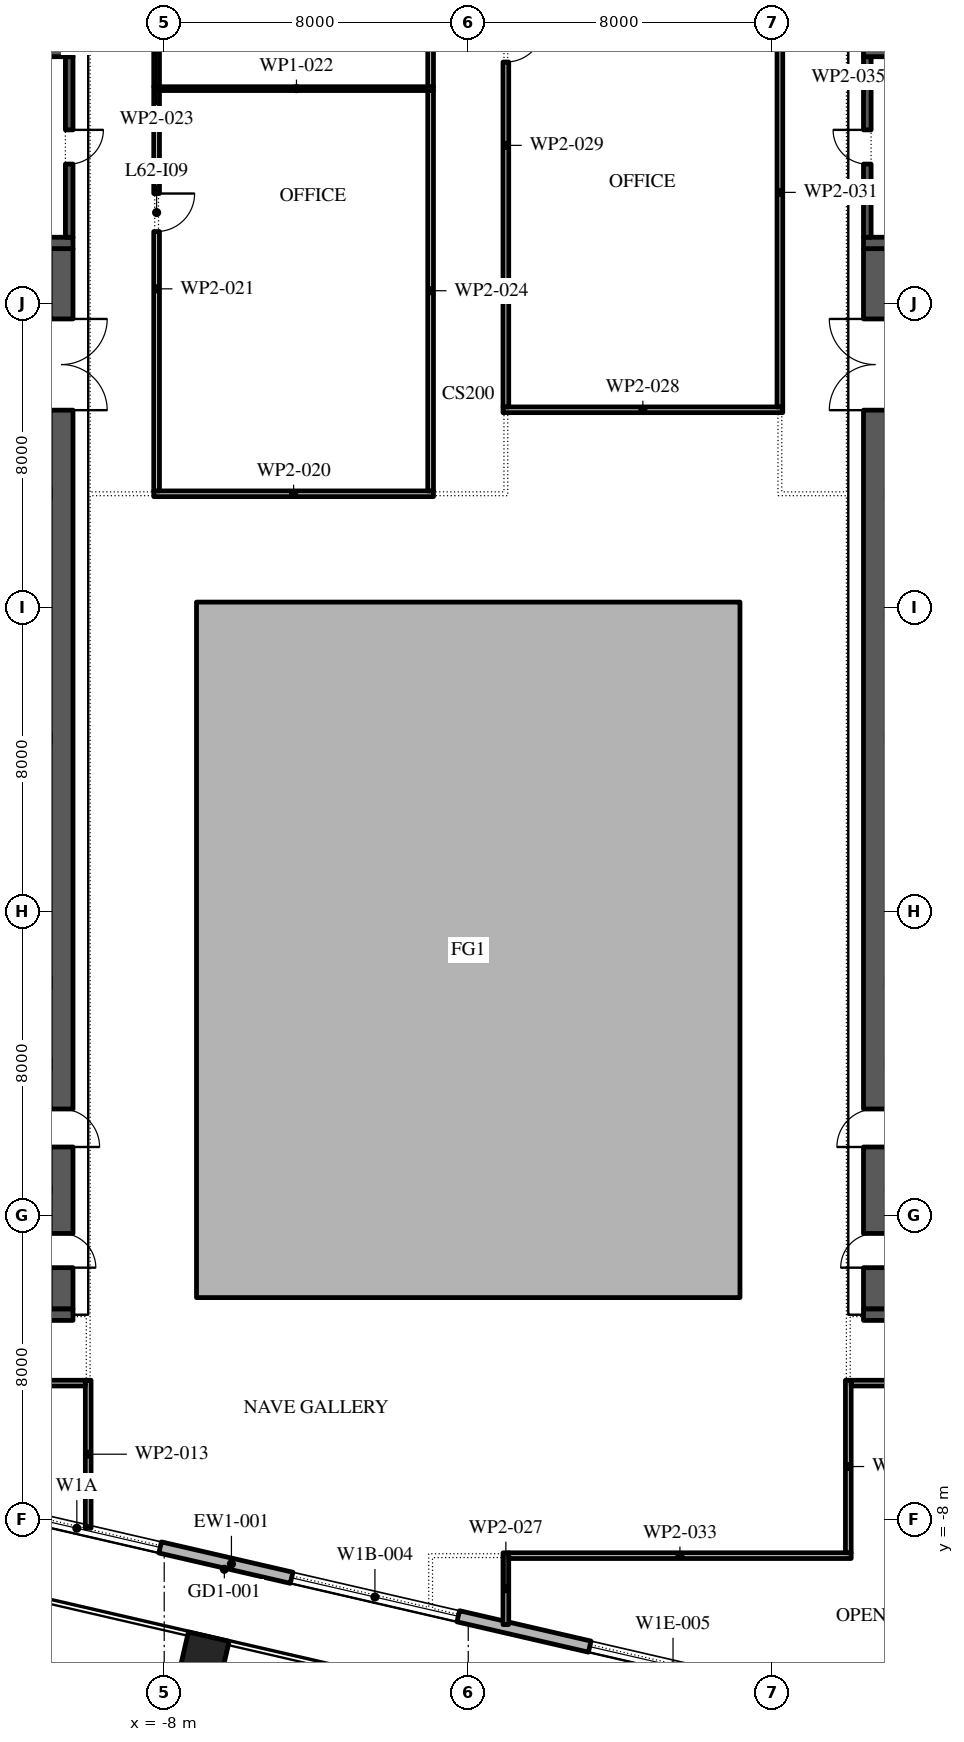
"""IFC4 building model, lengths in metres.
Left out: names, types, materials, properties, quantities, classifications, styles, units other than length and angle.
Written with IfcOpenShell. Run it as: python <this file> out.ifc"""

import sys

from ifc_helpers import new_model, si_unit, direction, frame, frame_2d, origin, origin_2d, place, context, subcontext, project, spatial, polyline, rectangle, outline, extrude, element, fill, save


model = new_model("IFC4")
c1 = context("Model", 3, precision=1e-05, world=origin(), true_north=direction((0.0, 1.0)))
c2 = subcontext(c1, "Body", "Model", "MODEL_VIEW")
j1 = project(units=[si_unit("LENGTHUNIT", "METRE"), si_unit("PLANEANGLEUNIT", "RADIAN")], contexts=[c1])
p1 = place(None, origin())
s1 = spatial("IfcSite", under=j1, at=p1, CompositionType="ELEMENT")
p2 = place(p1, origin())
s2 = spatial("IfcBuilding", under=s1, at=p2, CompositionType="ELEMENT")
p3 = place(p2, frame((0.0, 0.0, 285.0)))
s3 = spatial("IfcBuildingStorey", under=s2, at=p3, CompositionType="ELEMENT", Elevation=285.0)
p4 = place(p3, frame((-6.951, -11.608, 0.0), z_axis=(0.0, 0.0, 1.0), x_axis=(0.974370064785, -0.224951054344, 0.0)))
e1 = element("IfcColumn", 1, at=p4, inside=s3, PredefinedType="COLUMN", context=c2, shape_type="SweptSolid", body=[
    extrude(rectangle(XDim=1.1, YDim=1.1, at=origin_2d()), origin(), (0.0, 0.0, 1.0), 4.2),
])
p5 = place(p3, origin())
e2 = element("IfcWall", 2, at=p5, inside=s3, PredefinedType="STANDARD", context=c2, shape_type="SweptSolid", body=[
    extrude(outline(polyline([(-7.15, -2.15), (7.15, -2.15), (7.15, 16.15), (-7.15, 16.15), (-7.15, -2.15)]), holes=[polyline([(-7.0, -2.0), (-7.0, 16.0), (7.0, 16.0), (7.0, -2.0), (-7.0, -2.0)])]), origin(), (0.0, 0.0, 1.0), 4.0),
])
p6 = place(p3, frame((-29.616, -3.758, 0.0), z_axis=(0.0, 0.0, 1.0), x_axis=(0.974370532314, -0.224949029246, 0.0)))
e3 = element("IfcWall", 3, at=p6, inside=s3, PredefinedType="STANDARD", context=c2, shape_type="SweptSolid", body=[
    extrude(rectangle(XDim=48.0, YDim=0.3, at=frame_2d((24.0, 0.0))), origin(), (0.0, 0.0, 1.0), 4.0),
])
p7 = place(p6, frame((1.625, 0.0, 0.45)))
e4 = element("IfcOpeningElement", 4, at=p7, cuts=e3, PredefinedType="OPENING", context=c2, shape_type="SweptSolid", body=[
    extrude(rectangle(XDim=4.5, YDim=3.05, at=frame_2d((2.25, 1.525))), frame((0.0, 0.16, 0.0), z_axis=(0.0, -1.0, 0.0), x_axis=(1.0, 0.0, 0.0)), (0.0, 0.0, 1.0), 0.32),
])
p8 = place(p6, frame((10.575, 0.0, 0.0)))
e5 = element("IfcOpeningElement", 5, at=p8, cuts=e3, PredefinedType="OPENING", context=c2, shape_type="SweptSolid", body=[
    extrude(rectangle(XDim=2.4, YDim=3.5, at=frame_2d((1.2, 1.75))), frame((0.0, 0.16, 0.0), z_axis=(0.0, -1.0, 0.0), x_axis=(1.0, 0.0, 0.0)), (0.0, 0.0, 1.0), 0.32),
])
p9 = place(p6, frame((17.575, 0.0, 0.45)))
e6 = element("IfcOpeningElement", 6, at=p9, cuts=e3, PredefinedType="OPENING", context=c2, shape_type="SweptSolid", body=[
    extrude(rectangle(XDim=4.5, YDim=3.0, at=frame_2d((2.25, 1.5))), frame((0.0, 0.16, 0.0), z_axis=(0.0, -1.0, 0.0), x_axis=(1.0, 0.0, 0.0)), (0.0, 0.0, 1.0), 0.32),
])
p10 = place(p6, frame((25.625, 0.0, 0.45)))
e7 = element("IfcOpeningElement", 7, at=p10, cuts=e3, PredefinedType="OPENING", context=c2, shape_type="SweptSolid", body=[
    extrude(rectangle(XDim=4.5, YDim=2.95, at=frame_2d((2.25, 1.475))), frame((0.0, 0.16, 0.0), z_axis=(0.0, -1.0, 0.0), x_axis=(1.0, 0.0, 0.0)), (0.0, 0.0, 1.0), 0.32),
])
p11 = place(p6, frame((33.675, 0.0, 0.45)))
e8 = element("IfcOpeningElement", 8, at=p11, cuts=e3, PredefinedType="OPENING", context=c2, shape_type="SweptSolid", body=[
    extrude(rectangle(XDim=4.5, YDim=2.825, at=frame_2d((2.25, 1.413))), frame((0.0, 0.16, 0.0), z_axis=(0.0, -1.0, 0.0), x_axis=(1.0, 0.0, 0.0)), (0.0, 0.0, 1.0), 0.32),
])
p12 = place(p6, frame((42.775, 0.0, 0.0)))
e9 = element("IfcOpeningElement", 9, at=p12, cuts=e3, PredefinedType="OPENING", context=c2, shape_type="SweptSolid", body=[
    extrude(rectangle(XDim=2.4, YDim=3.5, at=frame_2d((1.2, 1.75))), frame((0.0, 0.16, 0.0), z_axis=(0.0, -1.0, 0.0), x_axis=(1.0, 0.0, 0.0)), (0.0, 0.0, 1.0), 0.32),
])
p13 = place(p3, frame((-10.7, -2.45, 0.0), z_axis=(0.0, 0.0, 1.0), x_axis=(0.0, 1.0, 0.0)))
e10 = element("IfcWall", 10, at=p13, inside=s3, PredefinedType="SHEAR", context=c2, shape_type="SweptSolid", body=[
    extrude(rectangle(XDim=27.9, YDim=0.6, at=frame_2d((13.95, 0.0))), origin(), (0.0, 0.0, 1.0), 4.0),
])
p14 = place(p13, frame((23.65, 0.0, 0.0)))
e11 = element("IfcOpeningElement", 11, at=p14, cuts=e10, PredefinedType="OPENING", context=c2, shape_type="SweptSolid", body=[
    extrude(rectangle(XDim=2.4, YDim=2.1, at=frame_2d((1.2, 1.05))), frame((0.0, 0.31, 0.0), z_axis=(0.0, -1.0, 0.0), x_axis=(1.0, 0.0, 0.0)), (0.0, 0.0, 1.0), 0.62),
])
p15 = place(p13, frame((1.087, 0.0, 0.0)))
e12 = element("IfcOpeningElement", 12, at=p15, cuts=e10, PredefinedType="OPENING", context=c2, shape_type="SweptSolid", body=[
    extrude(rectangle(XDim=0.9, YDim=2.1, at=frame_2d((0.45, 1.05))), frame((0.0, 0.31, 0.0), z_axis=(0.0, -1.0, 0.0), x_axis=(1.0, 0.0, 0.0)), (0.0, 0.0, 1.0), 0.62),
])
p16 = place(p13, frame((4.262, 0.0, 0.0)))
e13 = element("IfcOpeningElement", 13, at=p16, cuts=e10, PredefinedType="OPENING", context=c2, shape_type="SweptSolid", body=[
    extrude(rectangle(XDim=1.0, YDim=2.1, at=frame_2d((0.5, 1.05))), frame((0.0, 0.31, 0.0), z_axis=(0.0, -1.0, 0.0), x_axis=(1.0, 0.0, 0.0)), (0.0, 0.0, 1.0), 0.62),
])
for number, where, z_axis, x_axis in (
    (14, (-21.6, -2.6, 0.0), (0.0, 0.0, 1.0), (1.0, 0.0, 0.0)),
    (15, (-21.6, 25.6, 0.0), (0.0, 0.0, 1.0), (1.0, 0.0, 0.0)),
):
    element("IfcWall", number, at=place(p3, frame(where, z_axis=z_axis, x_axis=x_axis)), inside=s3, PredefinedType="SHEAR", context=c2, shape_type="SweptSolid", body=[
        extrude(rectangle(XDim=11.2, YDim=0.3, at=frame_2d((5.6, 0.0))), origin(), (0.0, 0.0, 1.0), 4.0),
    ])
p17 = place(p3, frame((-10.5, 25.75, 0.0), z_axis=(0.0, 0.0, 1.0), x_axis=(0.0, 1.0, 0.0)))
e16 = element("IfcWall", 16, at=p17, inside=s3, PredefinedType="SHEAR", context=c2, shape_type="SweptSolid", body=[
    extrude(rectangle(XDim=4.75, YDim=0.2, at=frame_2d((2.375, 0.0))), origin(), (0.0, 0.0, 1.0), 4.0),
])
p18 = place(p17, frame((1.925, 0.0, 0.0)))
e17 = element("IfcOpeningElement", 17, at=p18, cuts=e16, PredefinedType="OPENING", context=c2, shape_type="SweptSolid", body=[
    extrude(rectangle(XDim=0.9, YDim=2.1, at=frame_2d((0.45, 1.05))), frame((0.0, 0.11, 0.0), z_axis=(0.0, -1.0, 0.0), x_axis=(1.0, 0.0, 0.0)), (0.0, 0.0, 1.0), 0.22),
])
p19 = place(p3, frame((-21.6, 30.6, 0.0), z_axis=(0.0, 0.0, 1.0), x_axis=(1.0, 0.0, 0.0)))
e18 = element("IfcWall", 18, at=p19, inside=s3, PredefinedType="SHEAR", context=c2, shape_type="SweptSolid", body=[
    extrude(rectangle(XDim=11.2, YDim=0.2, at=frame_2d((5.6, 0.0))), origin(), (0.0, 0.0, 1.0), 4.0),
])
p20 = place(p3, frame((10.7, -2.45, 0.0), z_axis=(0.0, 0.0, 1.0), x_axis=(0.0, 1.0, 0.0)))
e19 = element("IfcWall", 19, at=p20, inside=s3, PredefinedType="SHEAR", context=c2, shape_type="SweptSolid", body=[
    extrude(rectangle(XDim=27.9, YDim=0.6, at=frame_2d((13.95, 0.0))), origin(), (0.0, 0.0, 1.0), 4.0),
])
p21 = place(p20, frame((23.65, 0.0, 0.0)))
e20 = element("IfcOpeningElement", 20, at=p21, cuts=e19, PredefinedType="OPENING", context=c2, shape_type="SweptSolid", body=[
    extrude(rectangle(XDim=2.4, YDim=2.1, at=frame_2d((1.2, 1.05))), frame((0.0, 0.31, 0.0), z_axis=(0.0, -1.0, 0.0), x_axis=(1.0, 0.0, 0.0)), (0.0, 0.0, 1.0), 0.62),
])
p22 = place(p20, frame((1.087, 0.0, 0.0)))
e21 = element("IfcOpeningElement", 21, at=p22, cuts=e19, PredefinedType="OPENING", context=c2, shape_type="SweptSolid", body=[
    extrude(rectangle(XDim=0.9, YDim=2.1, at=frame_2d((0.45, 1.05))), frame((0.0, 0.31, 0.0), z_axis=(0.0, -1.0, 0.0), x_axis=(1.0, 0.0, 0.0)), (0.0, 0.0, 1.0), 0.62),
])
p23 = place(p20, frame((4.262, 0.0, 0.0)))
e22 = element("IfcOpeningElement", 22, at=p23, cuts=e19, PredefinedType="OPENING", context=c2, shape_type="SweptSolid", body=[
    extrude(rectangle(XDim=1.0, YDim=2.1, at=frame_2d((0.5, 1.05))), frame((0.0, 0.31, 0.0), z_axis=(0.0, -1.0, 0.0), x_axis=(1.0, 0.0, 0.0)), (0.0, 0.0, 1.0), 0.62),
])
for number, where, z_axis, x_axis in (
    (23, (10.4, -2.6, 0.0), (0.0, 0.0, 1.0), (1.0, 0.0, 0.0)),
    (24, (10.4, 25.6, 0.0), (0.0, 0.0, 1.0), (1.0, 0.0, 0.0)),
):
    element("IfcWall", number, at=place(p3, frame(where, z_axis=z_axis, x_axis=x_axis)), inside=s3, PredefinedType="SHEAR", context=c2, shape_type="SweptSolid", body=[
        extrude(rectangle(XDim=11.2, YDim=0.3, at=frame_2d((5.6, 0.0))), origin(), (0.0, 0.0, 1.0), 4.0),
    ])
p24 = place(p3, frame((10.5, 25.75, 0.0), z_axis=(0.0, 0.0, 1.0), x_axis=(0.0, 1.0, 0.0)))
e25 = element("IfcWall", 25, at=p24, inside=s3, PredefinedType="SHEAR", context=c2, shape_type="SweptSolid", body=[
    extrude(rectangle(XDim=4.75, YDim=0.2, at=frame_2d((2.375, 0.0))), origin(), (0.0, 0.0, 1.0), 4.0),
])
p25 = place(p24, frame((1.925, 0.0, 0.0)))
e26 = element("IfcOpeningElement", 26, at=p25, cuts=e25, PredefinedType="OPENING", context=c2, shape_type="SweptSolid", body=[
    extrude(rectangle(XDim=0.9, YDim=2.1, at=frame_2d((0.45, 1.05))), frame((0.0, 0.11, 0.0), z_axis=(0.0, -1.0, 0.0), x_axis=(1.0, 0.0, 0.0)), (0.0, 0.0, 1.0), 0.22),
])
p26 = place(p3, frame((10.4, 30.6, 0.0), z_axis=(0.0, 0.0, 1.0), x_axis=(1.0, 0.0, 0.0)))
e27 = element("IfcWall", 27, at=p26, inside=s3, PredefinedType="SHEAR", context=c2, shape_type="SweptSolid", body=[
    extrude(rectangle(XDim=11.2, YDim=0.2, at=frame_2d((5.6, 0.0))), origin(), (0.0, 0.0, 1.0), 4.0),
])
p27 = place(p3, frame((-10.0, -8.216, 0.0), z_axis=(0.0, 0.0, 1.0), x_axis=(0.0, 1.0, 0.0)))
e28 = element("IfcWall", 28, at=p27, inside=s3, PredefinedType="PARTITIONING", context=c2, shape_type="SweptSolid", body=[
    extrude(rectangle(XDim=3.891, YDim=0.15, at=frame_2d((1.946, 0.0))), origin(), (0.0, 0.0, 1.0), 4.0),
])
p28 = place(p3, frame((-10.075, -4.4, 0.0), z_axis=(0.0, 0.0, 1.0), x_axis=(-1.0, 0.0, 0.0)))
e29 = element("IfcWall", 29, at=p28, inside=s3, PredefinedType="PARTITIONING", context=c2, shape_type="SweptSolid", body=[
    extrude(rectangle(XDim=11.88, YDim=0.15, at=frame_2d((5.94, 0.0))), origin(), (0.0, 0.0, 1.0), 4.0),
])
p29 = place(p28, frame((5.555, 0.0, 0.0)))
e30 = element("IfcOpeningElement", 30, at=p29, cuts=e29, PredefinedType="OPENING", context=c2, shape_type="SweptSolid", body=[
    extrude(rectangle(XDim=1.0, YDim=2.1, at=frame_2d((0.5, 1.05))), frame((0.0, 0.085, 0.0), z_axis=(0.0, -1.0, 0.0), x_axis=(1.0, 0.0, 0.0)), (0.0, 0.0, 1.0), 0.17),
])
p30 = place(p3, frame((-8.275, 19.0, 0.0), z_axis=(0.0, 0.0, 1.0), x_axis=(1.0, 0.0, 0.0)))
e31 = element("IfcWall", 31, at=p30, inside=s3, PredefinedType="PARTITIONING", context=c2, shape_type="SweptSolid", body=[
    extrude(rectangle(XDim=7.36, YDim=0.15, at=frame_2d((3.68, 0.0))), origin(), (0.0, 0.0, 1.0), 4.0),
])
p31 = place(p3, frame((-8.2, 29.71, 0.0), z_axis=(0.0, 0.0, 1.0), x_axis=(0.0, -1.0, 0.0)))
e32 = element("IfcWall", 32, at=p31, inside=s3, PredefinedType="PARTITIONING", context=c2, shape_type="SweptSolid", body=[
    extrude(rectangle(XDim=10.635, YDim=0.15, at=frame_2d((5.317, 0.0))), origin(), (0.0, 0.0, 1.0), 4.0),
])
p32 = place(p31, frame((2.81, 0.0, 0.0)))
e33 = element("IfcOpeningElement", 33, at=p32, cuts=e32, PredefinedType="OPENING", context=c2, shape_type="SweptSolid", body=[
    extrude(rectangle(XDim=1.0, YDim=2.1, at=frame_2d((0.5, 1.05))), frame((0.0, 0.085, 0.0), z_axis=(0.0, -1.0, 0.0), x_axis=(1.0, 0.0, 0.0)), (0.0, 0.0, 1.0), 0.17),
])
p33 = place(p3, frame((-8.125, 29.66, 0.0), z_axis=(0.0, 0.0, 1.0), x_axis=(1.0, 0.0, 0.0)))
e34 = element("IfcWall", 34, at=p33, inside=s3, PredefinedType="PARTITIONING", context=c2, shape_type="SweptSolid", body=[
    extrude(rectangle(XDim=7.21, YDim=0.1, at=frame_2d((3.605, 0.0))), origin(), (0.0, 0.0, 1.0), 4.0),
])
p34 = place(p3, frame((-8.2, 32.425, 0.0), z_axis=(0.0, 0.0, 1.0), x_axis=(0.0, -1.0, 0.0)))
e35 = element("IfcWall", 35, at=p34, inside=s3, PredefinedType="PARTITIONING", context=c2, shape_type="SweptSolid", body=[
    extrude(rectangle(XDim=2.715, YDim=0.15, at=frame_2d((1.357, 0.0))), origin(), (0.0, 0.0, 1.0), 4.0),
])
p35 = place(p3, frame((-0.99, 19.075, 0.0), z_axis=(0.0, 0.0, 1.0), x_axis=(0.0, 1.0, 0.0)))
e36 = element("IfcWall", 36, at=p35, inside=s3, PredefinedType="PARTITIONING", context=c2, shape_type="SweptSolid", body=[
    extrude(rectangle(XDim=10.535, YDim=0.15, at=frame_2d((5.268, 0.0))), origin(), (0.0, 0.0, 1.0), 4.0),
])
p36 = place(p3, frame((-0.99, 29.71, 0.0), z_axis=(0.0, 0.0, 1.0), x_axis=(0.0, 1.0, 0.0)))
e37 = element("IfcWall", 37, at=p36, inside=s3, PredefinedType="PARTITIONING", context=c2, shape_type="SweptSolid", body=[
    extrude(rectangle(XDim=12.24, YDim=0.15, at=frame_2d((6.12, 0.0))), origin(), (0.0, 0.0, 1.0), 4.0),
])
p37 = place(p36, frame((4.39, 0.0, 0.0)))
e38 = element("IfcOpeningElement", 38, at=p37, cuts=e37, PredefinedType="OPENING", context=c2, shape_type="SweptSolid", body=[
    extrude(rectangle(XDim=1.0, YDim=2.1, at=frame_2d((0.5, 1.05))), frame((0.0, 0.085, 0.0), z_axis=(0.0, -1.0, 0.0), x_axis=(1.0, 0.0, 0.0)), (0.0, 0.0, 1.0), 0.17),
])
p38 = place(p3, frame((0.99, -8.865, 0.0), z_axis=(0.0, 0.0, 1.0), x_axis=(0.0, -1.0, 0.0)))
e39 = element("IfcWall", 39, at=p38, inside=s3, PredefinedType="PARTITIONING", context=c2, shape_type="SweptSolid", body=[
    extrude(rectangle(XDim=1.888, YDim=0.15, at=frame_2d((0.944, 0.0))), origin(), (0.0, 0.0, 1.0), 4.0),
])
p39 = place(p3, frame((0.915, 21.21, 0.0), z_axis=(0.0, 0.0, 1.0), x_axis=(1.0, 0.0, 0.0)))
e40 = element("IfcWall", 40, at=p39, inside=s3, PredefinedType="PARTITIONING", context=c2, shape_type="SweptSolid", body=[
    extrude(rectangle(XDim=7.36, YDim=0.15, at=frame_2d((3.68, 0.0))), origin(), (0.0, 0.0, 1.0), 4.0),
])
p40 = place(p3, frame((0.99, 35.05, 0.0), z_axis=(0.0, 0.0, 1.0), x_axis=(0.0, -1.0, 0.0)))
e41 = element("IfcWall", 41, at=p40, inside=s3, PredefinedType="PARTITIONING", context=c2, shape_type="SweptSolid", body=[
    extrude(rectangle(XDim=13.765, YDim=0.15, at=frame_2d((6.883, 0.0))), origin(), (0.0, 0.0, 1.0), 4.0),
])
p41 = place(p40, frame((3.69, 0.0, 0.0)))
e42 = element("IfcOpeningElement", 42, at=p41, cuts=e41, PredefinedType="OPENING", context=c2, shape_type="SweptSolid", body=[
    extrude(rectangle(XDim=1.0, YDim=2.1, at=frame_2d((0.5, 1.05))), frame((0.0, 0.085, 0.0), z_axis=(0.0, -1.0, 0.0), x_axis=(1.0, 0.0, 0.0)), (0.0, 0.0, 1.0), 0.17),
])
p42 = place(p3, frame((8.2, 21.285, 0.0), z_axis=(0.0, 0.0, 1.0), x_axis=(0.0, 1.0, 0.0)))
e43 = element("IfcWall", 43, at=p42, inside=s3, PredefinedType="PARTITIONING", context=c2, shape_type="SweptSolid", body=[
    extrude(rectangle(XDim=11.29, YDim=0.15, at=frame_2d((5.645, 0.0))), origin(), (0.0, 0.0, 1.0), 4.0),
])
p43 = place(p3, frame((10.075, -8.94, 0.0), z_axis=(0.0, 0.0, 1.0), x_axis=(-1.0, 0.0, 0.0)))
e44 = element("IfcWall", 44, at=p43, inside=s3, PredefinedType="PARTITIONING", context=c2, shape_type="SweptSolid", body=[
    extrude(rectangle(XDim=9.01, YDim=0.15, at=frame_2d((4.505, 0.0))), origin(), (0.0, 0.0, 1.0), 4.0),
])
p44 = place(p3, frame((10.0, -4.325, 0.0), z_axis=(0.0, 0.0, 1.0), x_axis=(0.0, -1.0, 0.0)))
e45 = element("IfcWall", 45, at=p44, inside=s3, PredefinedType="PARTITIONING", context=c2, shape_type="SweptSolid", body=[
    extrude(rectangle(XDim=4.54, YDim=0.15, at=frame_2d((2.27, 0.0))), origin(), (0.0, 0.0, 1.0), 4.0),
])
p45 = place(p3, frame((22.968, -4.4, 0.0), z_axis=(0.0, 0.0, 1.0), x_axis=(-1.0, 0.0, 0.0)))
e46 = element("IfcWall", 46, at=p45, inside=s3, PredefinedType="PARTITIONING", context=c2, shape_type="SweptSolid", body=[
    extrude(rectangle(XDim=12.893, YDim=0.15, at=frame_2d((6.447, 0.0))), origin(), (0.0, 0.0, 1.0), 4.0),
])
p46 = place(p45, frame((3.318, 0.0, 0.0)))
e47 = element("IfcOpeningElement", 47, at=p46, cuts=e46, PredefinedType="OPENING", context=c2, shape_type="SweptSolid", body=[
    extrude(rectangle(XDim=1.0, YDim=2.1, at=frame_2d((0.5, 1.05))), frame((0.0, 0.085, 0.0), z_axis=(0.0, -1.0, 0.0), x_axis=(1.0, 0.0, 0.0)), (0.0, 0.0, 1.0), 0.17),
])
p47 = place(p9, origin())
e48 = element("IfcWindow", 48, at=p47, inside=s3, PartitioningType="DOUBLE_PANEL_VERTICAL", PredefinedType="WINDOW", context=c2, shape_type="SweptSolid", body=[
    extrude(rectangle(XDim=4.5, YDim=3.0, at=frame_2d((2.25, 1.5))), frame((0.0, 0.03, 0.0), z_axis=(0.0, -1.0, 0.0), x_axis=(1.0, 0.0, 0.0)), (0.0, 0.0, 1.0), 0.06),
])
fill(e6, e48)
p48 = place(p10, origin())
e49 = element("IfcWindow", 49, at=p48, inside=s3, PartitioningType="DOUBLE_PANEL_VERTICAL", PredefinedType="WINDOW", context=c2, shape_type="SweptSolid", body=[
    extrude(rectangle(XDim=4.5, YDim=2.95, at=frame_2d((2.25, 1.475))), frame((0.0, 0.03, 0.0), z_axis=(0.0, -1.0, 0.0), x_axis=(1.0, 0.0, 0.0)), (0.0, 0.0, 1.0), 0.06),
])
fill(e7, e49)
p49 = place(p11, origin())
e50 = element("IfcWindow", 50, at=p49, inside=s3, PartitioningType="DOUBLE_PANEL_VERTICAL", PredefinedType="WINDOW", context=c2, shape_type="SweptSolid", body=[
    extrude(rectangle(XDim=4.5, YDim=2.825, at=frame_2d((2.25, 1.413))), frame((0.0, 0.03, 0.0), z_axis=(0.0, -1.0, 0.0), x_axis=(1.0, 0.0, 0.0)), (0.0, 0.0, 1.0), 0.06),
])
fill(e8, e50)
p50 = place(p14, frame((2.4, 0.0, 0.0), z_axis=(0.0, 0.0, 1.0), x_axis=(-1.0, 0.0, 0.0)))
e51 = element("IfcDoor", 51, at=p50, inside=s3, OperationType="DOUBLE_DOOR_SINGLE_SWING", PredefinedType="DOOR", context=c2, shape_type="SweptSolid", body=[
    extrude(rectangle(XDim=2.4, YDim=2.1, at=frame_2d((1.2, 1.05))), frame((0.0, 0.025, 0.0), z_axis=(0.0, -1.0, 0.0), x_axis=(1.0, 0.0, 0.0)), (0.0, 0.0, 1.0), 0.05),
])
fill(e11, e51)
p51 = place(p18, frame((0.9, 0.15, 0.0), z_axis=(0.0, 0.0, 1.0), x_axis=(-1.0, 0.0, 0.0)))
e52 = element("IfcDoor", 52, at=p51, inside=s3, OperationType="SINGLE_SWING_RIGHT", PredefinedType="DOOR", context=c2, shape_type="SweptSolid", body=[
    extrude(rectangle(XDim=0.9, YDim=2.1, at=frame_2d((0.45, 1.05))), frame((0.0, 0.1, 0.0), z_axis=(0.0, -1.0, 0.0), x_axis=(1.0, 0.0, 0.0)), (0.0, 0.0, 1.0), 0.05),
])
fill(e17, e52)
p52 = place(p21, origin())
e53 = element("IfcDoor", 53, at=p52, inside=s3, OperationType="DOUBLE_DOOR_SINGLE_SWING", PredefinedType="DOOR", context=c2, shape_type="SweptSolid", body=[
    extrude(rectangle(XDim=2.4, YDim=2.1, at=frame_2d((1.2, 1.05))), frame((0.0, 0.025, 0.0), z_axis=(0.0, -1.0, 0.0), x_axis=(1.0, 0.0, 0.0)), (0.0, 0.0, 1.0), 0.05),
])
fill(e20, e53)
p53 = place(p25, origin())
e54 = element("IfcDoor", 54, at=p53, inside=s3, OperationType="SINGLE_SWING_LEFT", PredefinedType="DOOR", context=c2, shape_type="SweptSolid", body=[
    extrude(rectangle(XDim=0.9, YDim=2.1, at=frame_2d((0.45, 1.05))), frame((0.0, -0.05, 0.0), z_axis=(0.0, -1.0, 0.0), x_axis=(1.0, 0.0, 0.0)), (0.0, 0.0, 1.0), 0.05),
])
fill(e26, e54)
p54 = place(p41, origin())
e55 = element("IfcDoor", 55, at=p54, inside=s3, OperationType="SINGLE_SWING_RIGHT", PredefinedType="DOOR", context=c2, shape_type="SweptSolid", body=[
    extrude(rectangle(XDim=1.0, YDim=2.1, at=frame_2d((0.5, 1.05))), frame((0.0, 0.025, 0.0), z_axis=(0.0, -1.0, 0.0), x_axis=(1.0, 0.0, 0.0)), (0.0, 0.0, 1.0), 0.05),
])
fill(e42, e55)
p55 = place(p32, origin())
e56 = element("IfcDoor", 56, at=p55, inside=s3, OperationType="SINGLE_SWING_RIGHT", PredefinedType="DOOR", context=c2, shape_type="SweptSolid", body=[
    extrude(rectangle(XDim=1.0, YDim=2.1, at=frame_2d((0.5, 1.05))), frame((0.0, 0.025, 0.0), z_axis=(0.0, -1.0, 0.0), x_axis=(1.0, 0.0, 0.0)), (0.0, 0.0, 1.0), 0.05),
])
fill(e33, e56)
save(model, sys.argv[1])
